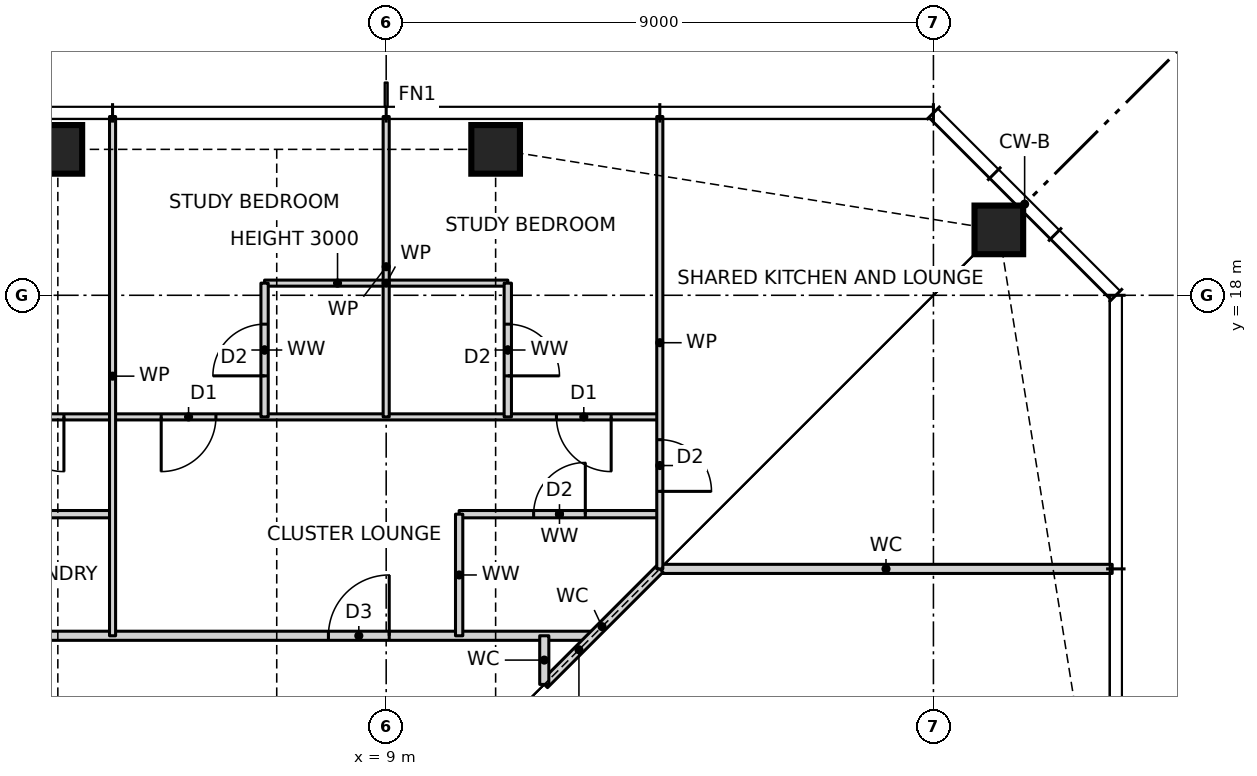
"""IFC4 building model, lengths in metres.
Left out: names, types, materials, properties, quantities, classifications, styles, units other than length and angle.
Written with IfcOpenShell. Run it as: python <this file> out.ifc"""

import sys

from ifc_helpers import new_model, si_unit, direction, frame, frame_2d, origin, origin_2d, place, context, subcontext, project, spatial, rectangle, hollow_rectangle, extrude, element, fill, save


model = new_model("IFC4")
c1 = context("Model", 3, precision=1e-05, world=origin(), true_north=direction((0.0, 1.0)))
c2 = subcontext(c1, "Body", "Model", "MODEL_VIEW")
j1 = project(units=[si_unit("LENGTHUNIT", "METRE"), si_unit("PLANEANGLEUNIT", "RADIAN")], contexts=[c1])
p1 = place(None, origin())
s1 = spatial("IfcSite", under=j1, at=p1, CompositionType="ELEMENT")
p2 = place(p1, origin())
s2 = spatial("IfcBuilding", under=s1, at=p2, CompositionType="ELEMENT")
p3 = place(p2, frame((0.0, 0.0, 119.0)))
s3 = spatial("IfcBuildingStorey", under=s2, at=p3, CompositionType="ELEMENT", Elevation=119.0)
for number, where, z_axis, x_axis in (
    (1, (19.076, 19.076, 0.0), (0.0, 0.0, 1.0), (1.0, 0.0, 0.0)),
    (2, (10.8, 20.4, 0.0), (0.0, 0.0, 1.0), (1.0, 0.0, 0.0)),
    (3, (3.6, 20.4, 0.0), (0.0, 0.0, 1.0), (1.0, 0.0, 0.0)),
):
    element("IfcColumn", number, at=place(p3, frame(where, z_axis=z_axis, x_axis=x_axis)), inside=s3, PredefinedType="COLUMN", context=c2, shape_type="SweptSolid", body=[
        extrude(hollow_rectangle(XDim=0.8, YDim=0.8, WallThickness=0.07, at=origin_2d()), origin(), (0.0, 0.0, 1.0), 3.5),
    ])
p4 = place(p3, frame((-9.0, 12.4, 0.0), z_axis=(0.0, 0.0, 1.0), x_axis=(1.0, 0.0, 0.0)))
e4 = element("IfcWall", 4, at=p4, inside=s3, PredefinedType="PARTITIONING", context=c2, shape_type="SweptSolid", body=[
    extrude(rectangle(XDim=21.4, YDim=0.15, at=frame_2d((10.7, 0.0))), origin(), (0.0, 0.0, 1.0), 3.27),
])
p5 = place(p4, frame((17.05, 0.0, 0.0)))
e5 = element("IfcOpeningElement", 5, at=p5, cuts=e4, PredefinedType="OPENING", context=c2, shape_type="SweptSolid", body=[
    extrude(rectangle(XDim=1.0, YDim=2.1, at=frame_2d((0.5, 1.05))), frame((0.0, 0.085, 0.0), z_axis=(0.0, -1.0, 0.0), x_axis=(1.0, 0.0, 0.0)), (0.0, 0.0, 1.0), 0.17),
])
p6 = place(p4, frame((1.65, 0.0, 0.0)))
e6 = element("IfcOpeningElement", 6, at=p6, cuts=e4, PredefinedType="OPENING", context=c2, shape_type="SweptSolid", body=[
    extrude(rectangle(XDim=1.0, YDim=2.1, at=frame_2d((0.5, 1.05))), frame((0.0, 0.085, 0.0), z_axis=(0.0, -1.0, 0.0), x_axis=(1.0, 0.0, 0.0)), (0.0, 0.0, 1.0), 0.17),
])
p7 = place(p3, frame((13.5, 13.5, 0.0), z_axis=(0.0, 0.0, 1.0), x_axis=(1.0, 0.0, 0.0)))
e7 = element("IfcWall", 7, at=p7, inside=s3, PredefinedType="PARTITIONING", context=c2, shape_type="SweptSolid", body=[
    extrude(rectangle(XDim=7.44, YDim=0.15, at=frame_2d((3.72, 0.0))), origin(), (0.0, 0.0, 1.0), 3.27),
])
p8 = place(p3, frame((1.0, 14.4, 0.0), z_axis=(0.0, 0.0, 1.0), x_axis=(1.0, 0.0, 0.0)))
e8 = element("IfcWall", 8, at=p8, inside=s3, PredefinedType="PARTITIONING", context=c2, shape_type="SweptSolid", body=[
    extrude(rectangle(XDim=3.5, YDim=0.12, at=frame_2d((1.75, 0.0))), origin(), (0.0, 0.0, 1.0), 3.27),
])
p9 = place(p8, frame((1.325, 0.0, 0.0)))
e9 = element("IfcOpeningElement", 9, at=p9, cuts=e8, PredefinedType="OPENING", context=c2, shape_type="SweptSolid", body=[
    extrude(rectangle(XDim=0.85, YDim=2.1, at=frame_2d((0.425, 1.05))), frame((0.0, 0.07, 0.0), z_axis=(0.0, -1.0, 0.0), x_axis=(1.0, 0.0, 0.0)), (0.0, 0.0, 1.0), 0.14),
])
p10 = place(p3, frame((10.2, 14.4, 0.0), z_axis=(0.0, 0.0, 1.0), x_axis=(1.0, 0.0, 0.0)))
e10 = element("IfcWall", 10, at=p10, inside=s3, PredefinedType="PARTITIONING", context=c2, shape_type="SweptSolid", body=[
    extrude(rectangle(XDim=3.3, YDim=0.12, at=frame_2d((1.65, 0.0))), origin(), (0.0, 0.0, 1.0), 3.27),
])
p11 = place(p10, frame((1.225, 0.0, 0.0)))
e11 = element("IfcOpeningElement", 11, at=p11, cuts=e10, PredefinedType="OPENING", context=c2, shape_type="SweptSolid", body=[
    extrude(rectangle(XDim=0.85, YDim=2.1, at=frame_2d((0.425, 1.05))), frame((0.0, 0.07, 0.0), z_axis=(0.0, -1.0, 0.0), x_axis=(1.0, 0.0, 0.0)), (0.0, 0.0, 1.0), 0.14),
])
p12 = place(p3, frame((-9.0, 16.0, 0.0), z_axis=(0.0, 0.0, 1.0), x_axis=(1.0, 0.0, 0.0)))
e12 = element("IfcWall", 12, at=p12, inside=s3, PredefinedType="PARTITIONING", context=c2, shape_type="SweptSolid", body=[
    extrude(rectangle(XDim=22.5, YDim=0.1, at=frame_2d((11.25, 0.0))), origin(), (0.0, 0.0, 1.0), 3.27),
])
p13 = place(p12, frame((20.8, 0.0, 0.0)))
e13 = element("IfcOpeningElement", 13, at=p13, cuts=e12, PredefinedType="OPENING", context=c2, shape_type="SweptSolid", body=[
    extrude(rectangle(XDim=0.9, YDim=2.1, at=frame_2d((0.45, 1.05))), frame((0.0, 0.06, 0.0), z_axis=(0.0, -1.0, 0.0), x_axis=(1.0, 0.0, 0.0)), (0.0, 0.0, 1.0), 0.12),
])
p14 = place(p12, frame((14.3, 0.0, 0.0)))
e14 = element("IfcOpeningElement", 14, at=p14, cuts=e12, PredefinedType="OPENING", context=c2, shape_type="SweptSolid", body=[
    extrude(rectangle(XDim=0.9, YDim=2.1, at=frame_2d((0.45, 1.05))), frame((0.0, 0.06, 0.0), z_axis=(0.0, -1.0, 0.0), x_axis=(1.0, 0.0, 0.0)), (0.0, 0.0, 1.0), 0.12),
])
p15 = place(p12, frame((11.8, 0.0, 0.0)))
e15 = element("IfcOpeningElement", 15, at=p15, cuts=e12, PredefinedType="OPENING", context=c2, shape_type="SweptSolid", body=[
    extrude(rectangle(XDim=0.9, YDim=2.1, at=frame_2d((0.45, 1.05))), frame((0.0, 0.06, 0.0), z_axis=(0.0, -1.0, 0.0), x_axis=(1.0, 0.0, 0.0)), (0.0, 0.0, 1.0), 0.12),
])
p16 = place(p12, frame((5.3, 0.0, 0.0)))
e16 = element("IfcOpeningElement", 16, at=p16, cuts=e12, PredefinedType="OPENING", context=c2, shape_type="SweptSolid", body=[
    extrude(rectangle(XDim=0.9, YDim=2.1, at=frame_2d((0.45, 1.05))), frame((0.0, 0.06, 0.0), z_axis=(0.0, -1.0, 0.0), x_axis=(1.0, 0.0, 0.0)), (0.0, 0.0, 1.0), 0.12),
])
p17 = place(p12, frame((2.8, 0.0, 0.0)))
e17 = element("IfcOpeningElement", 17, at=p17, cuts=e12, PredefinedType="OPENING", context=c2, shape_type="SweptSolid", body=[
    extrude(rectangle(XDim=0.9, YDim=2.1, at=frame_2d((0.45, 1.05))), frame((0.0, 0.06, 0.0), z_axis=(0.0, -1.0, 0.0), x_axis=(1.0, 0.0, 0.0)), (0.0, 0.0, 1.0), 0.12),
])
p18 = place(p3, frame((7.0, 18.2, 0.0), z_axis=(0.0, 0.0, 1.0), x_axis=(1.0, 0.0, 0.0)))
e18 = element("IfcWall", 18, at=p18, inside=s3, PredefinedType="PARTITIONING", context=c2, shape_type="SweptSolid", body=[
    extrude(rectangle(XDim=4.0, YDim=0.1, at=frame_2d((2.0, 0.0))), origin(), (0.0, 0.0, 1.0), 3.0),
])
p19 = place(p3, frame((11.6, 11.6, 0.0), z_axis=(0.0, 0.0, 1.0), x_axis=(0.707106781187, 0.707106781187, 0.0)))
e19 = element("IfcWall", 19, at=p19, inside=s3, PredefinedType="PARTITIONING", context=c2, shape_type="SweptSolid", body=[
    extrude(rectangle(XDim=2.687, YDim=0.15, at=frame_2d((1.343, 0.0))), origin(), (0.0, 0.0, 1.0), 2.343),
])
p20 = place(p3, frame((13.5, 13.5, 0.0), z_axis=(0.0, 0.0, 1.0), x_axis=(0.0, 1.0, 0.0)))
e20 = element("IfcWall", 20, at=p20, inside=s3, PredefinedType="PARTITIONING", context=c2, shape_type="SweptSolid", body=[
    extrude(rectangle(XDim=7.44, YDim=0.1, at=frame_2d((3.72, 0.0))), origin(), (0.0, 0.0, 1.0), 3.27),
])
p21 = place(p20, frame((1.275, 0.0, 0.0)))
e21 = element("IfcOpeningElement", 21, at=p21, cuts=e20, PredefinedType="OPENING", context=c2, shape_type="SweptSolid", body=[
    extrude(rectangle(XDim=0.85, YDim=2.1, at=frame_2d((0.425, 1.05))), frame((0.0, 0.06, 0.0), z_axis=(0.0, -1.0, 0.0), x_axis=(1.0, 0.0, 0.0)), (0.0, 0.0, 1.0), 0.12),
])
p22 = place(p3, frame((11.6, 11.6, 0.0), z_axis=(0.0, 0.0, 1.0), x_axis=(0.0, 1.0, 0.0)))
e22 = element("IfcWall", 22, at=p22, inside=s3, PredefinedType="PARTITIONING", context=c2, shape_type="SweptSolid", body=[
    extrude(rectangle(XDim=0.8, YDim=0.15, at=frame_2d((0.4, 0.0))), origin(), (0.0, 0.0, 1.0), 3.27),
])
p23 = place(p3, frame((11.0, 16.0, 0.0), z_axis=(0.0, 0.0, 1.0), x_axis=(0.0, 1.0, 0.0)))
e23 = element("IfcWall", 23, at=p23, inside=s3, PredefinedType="PARTITIONING", context=c2, shape_type="SweptSolid", body=[
    extrude(rectangle(XDim=2.2, YDim=0.12, at=frame_2d((1.1, 0.0))), origin(), (0.0, 0.0, 1.0), 3.27),
])
p24 = place(p23, frame((0.675, 0.0, 0.0)))
e24 = element("IfcOpeningElement", 24, at=p24, cuts=e23, PredefinedType="OPENING", context=c2, shape_type="SweptSolid", body=[
    extrude(rectangle(XDim=0.85, YDim=2.1, at=frame_2d((0.425, 1.05))), frame((0.0, 0.07, 0.0), z_axis=(0.0, -1.0, 0.0), x_axis=(1.0, 0.0, 0.0)), (0.0, 0.0, 1.0), 0.14),
])
p25 = place(p3, frame((10.2, 12.4, 0.0), z_axis=(0.0, 0.0, 1.0), x_axis=(0.0, 1.0, 0.0)))
e25 = element("IfcWall", 25, at=p25, inside=s3, PredefinedType="PARTITIONING", context=c2, shape_type="SweptSolid", body=[
    extrude(rectangle(XDim=2.0, YDim=0.12, at=frame_2d((1.0, 0.0))), origin(), (0.0, 0.0, 1.0), 3.27),
])
p26 = place(p3, frame((9.0, 16.0, 0.0), z_axis=(0.0, 0.0, 1.0), x_axis=(0.0, 1.0, 0.0)))
e26 = element("IfcWall", 26, at=p26, inside=s3, PredefinedType="PARTITIONING", context=c2, shape_type="SweptSolid", body=[
    extrude(rectangle(XDim=4.94, YDim=0.1, at=frame_2d((2.47, 0.0))), origin(), (0.0, 0.0, 1.0), 3.27),
])
p27 = place(p3, frame((7.0, 16.0, 0.0), z_axis=(0.0, 0.0, 1.0), x_axis=(0.0, 1.0, 0.0)))
e27 = element("IfcWall", 27, at=p27, inside=s3, PredefinedType="PARTITIONING", context=c2, shape_type="SweptSolid", body=[
    extrude(rectangle(XDim=2.2, YDim=0.12, at=frame_2d((1.1, 0.0))), origin(), (0.0, 0.0, 1.0), 3.27),
])
p28 = place(p27, frame((0.675, 0.0, 0.0)))
e28 = element("IfcOpeningElement", 28, at=p28, cuts=e27, PredefinedType="OPENING", context=c2, shape_type="SweptSolid", body=[
    extrude(rectangle(XDim=0.85, YDim=2.1, at=frame_2d((0.425, 1.05))), frame((0.0, 0.07, 0.0), z_axis=(0.0, -1.0, 0.0), x_axis=(1.0, 0.0, 0.0)), (0.0, 0.0, 1.0), 0.14),
])
p29 = place(p3, frame((4.5, 12.4, 0.0), z_axis=(0.0, 0.0, 1.0), x_axis=(0.0, 1.0, 0.0)))
e29 = element("IfcWall", 29, at=p29, inside=s3, PredefinedType="PARTITIONING", context=c2, shape_type="SweptSolid", body=[
    extrude(rectangle(XDim=8.54, YDim=0.1, at=frame_2d((4.27, 0.0))), origin(), (0.0, 0.0, 1.0), 3.27),
])
p30 = place(p24, frame((0.85, 0.0, 0.0), z_axis=(0.0, 0.0, 1.0), x_axis=(-1.0, 0.0, 0.0)))
e30 = element("IfcDoor", 30, at=p30, inside=s3, OperationType="SINGLE_SWING_RIGHT", PredefinedType="DOOR", context=c2, shape_type="SweptSolid", body=[
    extrude(rectangle(XDim=0.85, YDim=2.1, at=frame_2d((0.425, 1.05))), frame((0.0, 0.025, 0.0), z_axis=(0.0, -1.0, 0.0), x_axis=(1.0, 0.0, 0.0)), (0.0, 0.0, 1.0), 0.05),
])
fill(e24, e30)
p31 = place(p13, frame((0.9, 0.0, 0.0), z_axis=(0.0, 0.0, 1.0), x_axis=(-1.0, 0.0, 0.0)))
e31 = element("IfcDoor", 31, at=p31, inside=s3, OperationType="SINGLE_SWING_LEFT", PredefinedType="DOOR", context=c2, shape_type="SweptSolid", body=[
    extrude(rectangle(XDim=0.9, YDim=2.1, at=frame_2d((0.45, 1.05))), frame((0.0, 0.025, 0.0), z_axis=(0.0, -1.0, 0.0), x_axis=(1.0, 0.0, 0.0)), (0.0, 0.0, 1.0), 0.05),
])
fill(e13, e31)
p32 = place(p28, origin())
e32 = element("IfcDoor", 32, at=p32, inside=s3, OperationType="SINGLE_SWING_LEFT", PredefinedType="DOOR", context=c2, shape_type="SweptSolid", body=[
    extrude(rectangle(XDim=0.85, YDim=2.1, at=frame_2d((0.425, 1.05))), frame((0.0, 0.025, 0.0), z_axis=(0.0, -1.0, 0.0), x_axis=(1.0, 0.0, 0.0)), (0.0, 0.0, 1.0), 0.05),
])
fill(e28, e32)
p33 = place(p14, frame((0.9, 0.0, 0.0), z_axis=(0.0, 0.0, 1.0), x_axis=(-1.0, 0.0, 0.0)))
e33 = element("IfcDoor", 33, at=p33, inside=s3, OperationType="SINGLE_SWING_RIGHT", PredefinedType="DOOR", context=c2, shape_type="SweptSolid", body=[
    extrude(rectangle(XDim=0.9, YDim=2.1, at=frame_2d((0.45, 1.05))), frame((0.0, 0.025, 0.0), z_axis=(0.0, -1.0, 0.0), x_axis=(1.0, 0.0, 0.0)), (0.0, 0.0, 1.0), 0.05),
])
fill(e14, e33)
p34 = place(p5, origin())
e34 = element("IfcDoor", 34, at=p34, inside=s3, OperationType="SINGLE_SWING_RIGHT", PredefinedType="DOOR", context=c2, shape_type="SweptSolid", body=[
    extrude(rectangle(XDim=1.0, YDim=2.1, at=frame_2d((0.5, 1.05))), frame((0.0, 0.025, 0.0), z_axis=(0.0, -1.0, 0.0), x_axis=(1.0, 0.0, 0.0)), (0.0, 0.0, 1.0), 0.05),
])
fill(e5, e34)
p35 = place(p11, origin())
e35 = element("IfcDoor", 35, at=p35, inside=s3, OperationType="SINGLE_SWING_RIGHT", PredefinedType="DOOR", context=c2, shape_type="SweptSolid", body=[
    extrude(rectangle(XDim=0.85, YDim=2.1, at=frame_2d((0.425, 1.05))), frame((0.0, 0.025, 0.0), z_axis=(0.0, -1.0, 0.0), x_axis=(1.0, 0.0, 0.0)), (0.0, 0.0, 1.0), 0.05),
])
fill(e11, e35)
p36 = place(p15, frame((0.9, 0.0, 0.0), z_axis=(0.0, 0.0, 1.0), x_axis=(-1.0, 0.0, 0.0)))
e36 = element("IfcDoor", 36, at=p36, inside=s3, OperationType="SINGLE_SWING_LEFT", PredefinedType="DOOR", context=c2, shape_type="SweptSolid", body=[
    extrude(rectangle(XDim=0.9, YDim=2.1, at=frame_2d((0.45, 1.05))), frame((0.0, 0.025, 0.0), z_axis=(0.0, -1.0, 0.0), x_axis=(1.0, 0.0, 0.0)), (0.0, 0.0, 1.0), 0.05),
])
fill(e15, e36)
p37 = place(p21, frame((0.85, 0.0, 0.0), z_axis=(0.0, 0.0, 1.0), x_axis=(-1.0, 0.0, 0.0)))
e37 = element("IfcDoor", 37, at=p37, inside=s3, OperationType="SINGLE_SWING_RIGHT", PredefinedType="DOOR", context=c2, shape_type="SweptSolid", body=[
    extrude(rectangle(XDim=0.85, YDim=2.1, at=frame_2d((0.425, 1.05))), frame((0.0, 0.025, 0.0), z_axis=(0.0, -1.0, 0.0), x_axis=(1.0, 0.0, 0.0)), (0.0, 0.0, 1.0), 0.05),
])
fill(e21, e37)
save(model, sys.argv[1])
